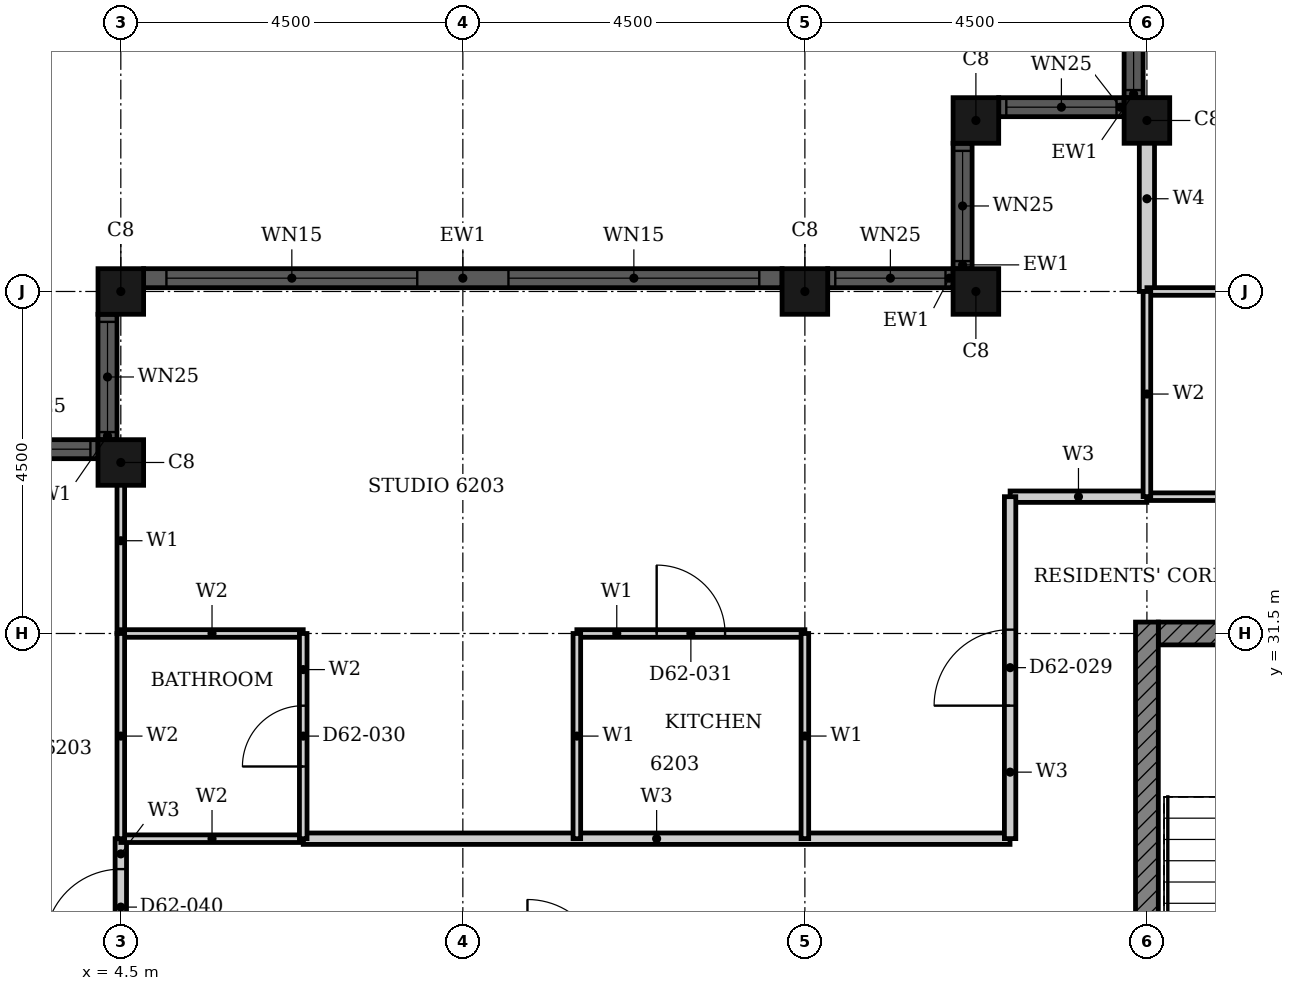
"""IFC4 building model, lengths in metres.
Left out: names, types, materials, properties, quantities, classifications, styles, units other than length and angle.
Written with IfcOpenShell. Run it as: python <this file> out.ifc"""

import sys

from ifc_helpers import new_model, si_unit, direction, frame, frame_2d, origin, origin_2d, place, context, subcontext, project, spatial, rectangle, hollow_rectangle, extrude, element, fill, save


model = new_model("IFC4")
c1 = context("Model", 3, precision=1e-05, world=origin(), true_north=direction((0.0, 1.0)))
c2 = subcontext(c1, "Body", "Model", "MODEL_VIEW")
j1 = project(units=[si_unit("LENGTHUNIT", "METRE"), si_unit("PLANEANGLEUNIT", "RADIAN")], contexts=[c1])
p1 = place(None, origin())
s1 = spatial("IfcSite", under=j1, at=p1, CompositionType="ELEMENT")
p2 = place(p1, origin())
s2 = spatial("IfcBuilding", under=s1, at=p2, CompositionType="ELEMENT")
p3 = place(p2, frame((0.0, 0.0, 245.3)))
s3 = spatial("IfcBuildingStorey", under=s2, at=p3, CompositionType="ELEMENT", Elevation=245.3)
for number, where, z_axis, x_axis in (
    (1, (18.0, 38.25, 0.0), (0.0, 0.0, 1.0), (1.0, 0.0, 0.0)),
    (2, (15.75, 38.25, 0.0), (0.0, 0.0, 1.0), (1.0, 0.0, 0.0)),
    (3, (15.75, 36.0, 0.0), (0.0, 0.0, 1.0), (1.0, 0.0, 0.0)),
    (4, (13.5, 36.0, 0.0), (0.0, 0.0, 1.0), (1.0, 0.0, 0.0)),
    (5, (4.5, 36.0, 0.0), (0.0, 0.0, 1.0), (1.0, 0.0, 0.0)),
    (6, (4.5, 33.75, 0.0), (0.0, 0.0, 1.0), (1.0, 0.0, 0.0)),
):
    element("IfcColumn", number, at=place(p3, frame(where, z_axis=z_axis, x_axis=x_axis)), inside=s3, PredefinedType="COLUMN", context=c2, shape_type="SweptSolid", body=[
        extrude(hollow_rectangle(XDim=0.6, YDim=0.6, WallThickness=0.02, at=origin_2d()), origin(), (0.0, 0.0, 1.0), 3.7),
    ])
p4 = place(p3, frame((17.825, 40.2, 0.0), z_axis=(0.0, 0.0, 1.0), x_axis=(0.0, -1.0, 0.0)))
e7 = element("IfcWall", 7, at=p4, inside=s3, PredefinedType="SOLIDWALL", context=c2, shape_type="SweptSolid", body=[
    extrude(rectangle(XDim=1.65, YDim=0.25, at=frame_2d((0.825, 0.0))), origin(), (0.0, 0.0, 1.0), 3.7),
])
p5 = place(p4, frame((0.1, 0.0, 0.9)))
e8 = element("IfcOpeningElement", 8, at=p5, cuts=e7, PredefinedType="OPENING", context=c2, shape_type="SweptSolid", body=[
    extrude(rectangle(XDim=1.45, YDim=1.85, at=frame_2d((0.725, 0.925))), frame((0.0, 0.135, 0.0), z_axis=(0.0, -1.0, 0.0), x_axis=(1.0, 0.0, 0.0)), (0.0, 0.0, 1.0), 0.27),
])
p6 = place(p3, frame((17.7, 38.425, 0.0), z_axis=(0.0, 0.0, 1.0), x_axis=(-1.0, 0.0, 0.0)))
e9 = element("IfcWall", 9, at=p6, inside=s3, PredefinedType="SOLIDWALL", context=c2, shape_type="SweptSolid", body=[
    extrude(rectangle(XDim=1.65, YDim=0.25, at=frame_2d((0.825, 0.0))), origin(), (0.0, 0.0, 1.0), 3.7),
])
p7 = place(p6, frame((0.1, 0.0, 0.9)))
e10 = element("IfcOpeningElement", 10, at=p7, cuts=e9, PredefinedType="OPENING", context=c2, shape_type="SweptSolid", body=[
    extrude(rectangle(XDim=1.45, YDim=1.85, at=frame_2d((0.725, 0.925))), frame((0.0, 0.135, 0.0), z_axis=(0.0, -1.0, 0.0), x_axis=(1.0, 0.0, 0.0)), (0.0, 0.0, 1.0), 0.27),
])
p8 = place(p3, frame((15.575, 37.95, 0.0), z_axis=(0.0, 0.0, 1.0), x_axis=(0.0, -1.0, 0.0)))
e11 = element("IfcWall", 11, at=p8, inside=s3, PredefinedType="SOLIDWALL", context=c2, shape_type="SweptSolid", body=[
    extrude(rectangle(XDim=1.65, YDim=0.25, at=frame_2d((0.825, 0.0))), origin(), (0.0, 0.0, 1.0), 3.7),
])
p9 = place(p8, frame((0.1, 0.0, 0.9)))
e12 = element("IfcOpeningElement", 12, at=p9, cuts=e11, PredefinedType="OPENING", context=c2, shape_type="SweptSolid", body=[
    extrude(rectangle(XDim=1.45, YDim=1.85, at=frame_2d((0.725, 0.925))), frame((0.0, 0.135, 0.0), z_axis=(0.0, -1.0, 0.0), x_axis=(1.0, 0.0, 0.0)), (0.0, 0.0, 1.0), 0.27),
])
p10 = place(p3, frame((15.45, 36.175, 0.0), z_axis=(0.0, 0.0, 1.0), x_axis=(-1.0, 0.0, 0.0)))
e13 = element("IfcWall", 13, at=p10, inside=s3, PredefinedType="SOLIDWALL", context=c2, shape_type="SweptSolid", body=[
    extrude(rectangle(XDim=1.65, YDim=0.25, at=frame_2d((0.825, 0.0))), origin(), (0.0, 0.0, 1.0), 3.7),
])
p11 = place(p10, frame((0.1, 0.0, 0.9)))
e14 = element("IfcOpeningElement", 14, at=p11, cuts=e13, PredefinedType="OPENING", context=c2, shape_type="SweptSolid", body=[
    extrude(rectangle(XDim=1.45, YDim=1.85, at=frame_2d((0.725, 0.925))), frame((0.0, 0.135, 0.0), z_axis=(0.0, -1.0, 0.0), x_axis=(1.0, 0.0, 0.0)), (0.0, 0.0, 1.0), 0.27),
])
p12 = place(p3, frame((13.2, 36.175, 0.0), z_axis=(0.0, 0.0, 1.0), x_axis=(-1.0, 0.0, 0.0)))
e15 = element("IfcWall", 15, at=p12, inside=s3, PredefinedType="SOLIDWALL", context=c2, shape_type="SweptSolid", body=[
    extrude(rectangle(XDim=8.4, YDim=0.25, at=frame_2d((4.2, 0.0))), origin(), (0.0, 0.0, 1.0), 3.7),
])
p13 = place(p12, frame((0.3, 0.0, 0.45)))
e16 = element("IfcOpeningElement", 16, at=p13, cuts=e15, PredefinedType="OPENING", context=c2, shape_type="SweptSolid", body=[
    extrude(rectangle(XDim=3.3, YDim=2.3, at=frame_2d((1.65, 1.15))), frame((0.0, 0.135, 0.0), z_axis=(0.0, -1.0, 0.0), x_axis=(1.0, 0.0, 0.0)), (0.0, 0.0, 1.0), 0.27),
])
p14 = place(p12, frame((4.8, 0.0, 0.45)))
e17 = element("IfcOpeningElement", 17, at=p14, cuts=e15, PredefinedType="OPENING", context=c2, shape_type="SweptSolid", body=[
    extrude(rectangle(XDim=3.3, YDim=2.3, at=frame_2d((1.65, 1.15))), frame((0.0, 0.135, 0.0), z_axis=(0.0, -1.0, 0.0), x_axis=(1.0, 0.0, 0.0)), (0.0, 0.0, 1.0), 0.27),
])
p15 = place(p3, frame((4.325, 35.7, 0.0), z_axis=(0.0, 0.0, 1.0), x_axis=(0.0, -1.0, 0.0)))
e18 = element("IfcWall", 18, at=p15, inside=s3, PredefinedType="SOLIDWALL", context=c2, shape_type="SweptSolid", body=[
    extrude(rectangle(XDim=1.65, YDim=0.25, at=frame_2d((0.825, 0.0))), origin(), (0.0, 0.0, 1.0), 3.7),
])
p16 = place(p15, frame((0.1, 0.0, 0.9)))
e19 = element("IfcOpeningElement", 19, at=p16, cuts=e18, PredefinedType="OPENING", context=c2, shape_type="SweptSolid", body=[
    extrude(rectangle(XDim=1.45, YDim=1.85, at=frame_2d((0.725, 0.925))), frame((0.0, 0.135, 0.0), z_axis=(0.0, -1.0, 0.0), x_axis=(1.0, 0.0, 0.0)), (0.0, 0.0, 1.0), 0.27),
])
p17 = place(p3, frame((4.2, 33.925, 0.0), z_axis=(0.0, 0.0, 1.0), x_axis=(-1.0, 0.0, 0.0)))
e20 = element("IfcWall", 20, at=p17, inside=s3, PredefinedType="SOLIDWALL", context=c2, shape_type="SweptSolid", body=[
    extrude(rectangle(XDim=1.65, YDim=0.25, at=frame_2d((0.825, 0.0))), origin(), (0.0, 0.0, 1.0), 3.7),
])
p18 = place(p17, frame((0.1, 0.0, 0.9)))
e21 = element("IfcOpeningElement", 21, at=p18, cuts=e20, PredefinedType="OPENING", context=c2, shape_type="SweptSolid", body=[
    extrude(rectangle(XDim=1.45, YDim=1.85, at=frame_2d((0.725, 0.925))), frame((0.0, 0.135, 0.0), z_axis=(0.0, -1.0, 0.0), x_axis=(1.0, 0.0, 0.0)), (0.0, 0.0, 1.0), 0.27),
])
p19 = place(p3, frame((18.15, 31.5, 0.0), z_axis=(0.0, 0.0, 1.0), x_axis=(1.0, 0.0, 0.0)))
e22 = element("IfcWall", 22, at=p19, inside=s3, PredefinedType="SHEAR", context=c2, shape_type="SweptSolid", body=[
    extrude(rectangle(XDim=9.368, YDim=0.3, at=frame_2d((4.684, 0.0))), origin(), (0.0, 0.0, 1.0), 3.4),
])
p20 = place(p19, frame((4.736, 0.0, 0.0)))
e23 = element("IfcOpeningElement", 23, at=p20, cuts=e22, PredefinedType="OPENING", context=c2, shape_type="SweptSolid", body=[
    extrude(rectangle(XDim=1.8, YDim=2.1, at=frame_2d((0.9, 1.05))), frame((0.0, 0.16, 0.0), z_axis=(0.0, -1.0, 0.0), x_axis=(1.0, 0.0, 0.0)), (0.0, 0.0, 1.0), 0.32),
])
p21 = place(p3, frame((18.0, 22.35, 0.0), z_axis=(0.0, 0.0, 1.0), x_axis=(0.0, 1.0, 0.0)))
e24 = element("IfcWall", 24, at=p21, inside=s3, PredefinedType="SHEAR", context=c2, shape_type="SweptSolid", body=[
    extrude(rectangle(XDim=9.3, YDim=0.3, at=frame_2d((4.65, 0.0))), origin(), (0.0, 0.0, 1.0), 3.4),
])
p22 = place(p3, frame((6.9, 28.8, 0.0), z_axis=(0.0, 0.0, 1.0), x_axis=(1.0, 0.0, 0.0)))
e25 = element("IfcWall", 25, at=p22, inside=s3, PredefinedType="PARTITIONING", context=c2, shape_type="SweptSolid", body=[
    extrude(rectangle(XDim=9.299, YDim=0.15, at=frame_2d((4.649, 0.0))), origin(), (0.0, 0.0, 1.0), 3.4),
])
p23 = place(p3, frame((16.2, 33.3, 0.0), z_axis=(0.0, 0.0, 1.0), x_axis=(1.0, 0.0, 0.0)))
e26 = element("IfcWall", 26, at=p23, inside=s3, PredefinedType="PARTITIONING", context=c2, shape_type="SweptSolid", body=[
    extrude(rectangle(XDim=1.799, YDim=0.15, at=frame_2d((0.899, 0.0))), origin(), (0.0, 0.0, 1.0), 3.4),
])
p24 = place(p3, frame((16.2, 28.801, 0.0), z_axis=(0.0, 0.0, 1.0), x_axis=(0.0, 1.0, 0.0)))
e27 = element("IfcWall", 27, at=p24, inside=s3, PredefinedType="PARTITIONING", context=c2, shape_type="SweptSolid", body=[
    extrude(rectangle(XDim=4.499, YDim=0.15, at=frame_2d((2.25, 0.0))), origin(), (0.0, 0.0, 1.0), 3.4),
])
p25 = place(p24, frame((1.75, 0.0, 0.0)))
e28 = element("IfcOpeningElement", 28, at=p25, cuts=e27, PredefinedType="OPENING", context=c2, shape_type="SweptSolid", body=[
    extrude(rectangle(XDim=1.0, YDim=2.2, at=frame_2d((0.5, 1.1))), frame((0.0, 0.085, 0.0), z_axis=(0.0, -1.0, 0.0), x_axis=(1.0, 0.0, 0.0)), (0.0, 0.0, 1.0), 0.17),
])
p26 = place(p3, frame((4.5, 27.0, 0.0), z_axis=(0.0, 0.0, 1.0), x_axis=(0.0, 1.0, 0.0)))
e29 = element("IfcWall", 29, at=p26, inside=s3, PredefinedType="PARTITIONING", context=c2, shape_type="SweptSolid", body=[
    extrude(rectangle(XDim=1.8, YDim=0.15, at=frame_2d((0.9, 0.0))), origin(), (0.0, 0.0, 1.0), 3.4),
])
p27 = place(p26, frame((0.4, 0.0, 0.0)))
e30 = element("IfcOpeningElement", 30, at=p27, cuts=e29, PredefinedType="OPENING", context=c2, shape_type="SweptSolid", body=[
    extrude(rectangle(XDim=1.0, YDim=2.1, at=frame_2d((0.5, 1.05))), frame((0.0, 0.085, 0.0), z_axis=(0.0, -1.0, 0.0), x_axis=(1.0, 0.0, 0.0)), (0.0, 0.0, 1.0), 0.17),
])
p28 = place(p3, frame((10.5, 31.5, 0.0), z_axis=(0.0, 0.0, 1.0), x_axis=(1.0, 0.0, 0.0)))
e31 = element("IfcWall", 31, at=p28, inside=s3, PredefinedType="PARTITIONING", context=c2, shape_type="SweptSolid", body=[
    extrude(rectangle(XDim=3.0, YDim=0.1, at=frame_2d((1.5, 0.0))), origin(), (0.0, 0.0, 1.0), 2.68),
])
p29 = place(p28, frame((1.05, 0.0, 0.0)))
e32 = element("IfcOpeningElement", 32, at=p29, cuts=e31, PredefinedType="OPENING", context=c2, shape_type="SweptSolid", body=[
    extrude(rectangle(XDim=0.9, YDim=2.1, at=frame_2d((0.45, 1.05))), frame((0.0, 0.06, 0.0), z_axis=(0.0, -1.0, 0.0), x_axis=(1.0, 0.0, 0.0)), (0.0, 0.0, 1.0), 0.12),
])
p30 = place(p3, frame((10.5, 28.8, 0.0), z_axis=(0.0, 0.0, 1.0), x_axis=(0.0, 1.0, 0.0)))
e33 = element("IfcWall", 33, at=p30, inside=s3, PredefinedType="PARTITIONING", context=c2, shape_type="SweptSolid", body=[
    extrude(rectangle(XDim=2.7, YDim=0.1, at=frame_2d((1.35, 0.0))), origin(), (0.0, 0.0, 1.0), 3.4),
])
p31 = place(p3, frame((13.5, 28.801, 0.0), z_axis=(0.0, 0.0, 1.0), x_axis=(0.0, 1.0, 0.0)))
e34 = element("IfcWall", 34, at=p31, inside=s3, PredefinedType="PARTITIONING", context=c2, shape_type="SweptSolid", body=[
    extrude(rectangle(XDim=2.699, YDim=0.1, at=frame_2d((1.35, 0.0))), origin(), (0.0, 0.0, 1.0), 2.48),
])
p32 = place(p3, frame((4.5, 31.501, 0.0), z_axis=(0.0, 0.0, 1.0), x_axis=(0.0, 1.0, 0.0)))
e35 = element("IfcWall", 35, at=p32, inside=s3, PredefinedType="PARTITIONING", context=c2, shape_type="SweptSolid", body=[
    extrude(rectangle(XDim=2.439, YDim=0.1, at=frame_2d((1.219, 0.0))), origin(), (0.0, 0.0, 1.0), 3.4),
])
p33 = place(p3, frame((18.0, 36.0, 0.0), z_axis=(0.0, 0.0, 1.0), x_axis=(0.0, 1.0, 0.0)))
e36 = element("IfcWall", 36, at=p33, inside=s3, PredefinedType="PARTITIONING", context=c2, shape_type="SweptSolid", body=[
    extrude(rectangle(XDim=2.44, YDim=0.2, at=frame_2d((1.22, 0.0))), origin(), (0.0, 0.0, 1.0), 3.4),
])
p34 = place(p3, frame((4.5, 28.8, 0.0), z_axis=(0.0, 0.0, 1.0), x_axis=(1.0, 0.0, 0.0)))
e37 = element("IfcWall", 37, at=p34, inside=s3, PredefinedType="PARTITIONING", context=c2, shape_type="SweptSolid", body=[
    extrude(rectangle(XDim=2.4, YDim=0.1, at=frame_2d((1.2, 0.0))), origin(), (0.0, 0.0, 1.0), 3.4),
])
p35 = place(p3, frame((4.5, 31.5, 0.0), z_axis=(0.0, 0.0, 1.0), x_axis=(1.0, 0.0, 0.0)))
e38 = element("IfcWall", 38, at=p35, inside=s3, PredefinedType="PARTITIONING", context=c2, shape_type="SweptSolid", body=[
    extrude(rectangle(XDim=2.4, YDim=0.1, at=frame_2d((1.2, 0.0))), origin(), (0.0, 0.0, 1.0), 2.68),
])
p36 = place(p3, frame((18.0, 33.3, 0.0), z_axis=(0.0, 0.0, 1.0), x_axis=(1.0, 0.0, 0.0)))
e39 = element("IfcWall", 39, at=p36, inside=s3, PredefinedType="PARTITIONING", context=c2, shape_type="SweptSolid", body=[
    extrude(rectangle(XDim=3.6, YDim=0.1, at=frame_2d((1.8, 0.0))), origin(), (0.0, 0.0, 1.0), 3.4),
])
p37 = place(p3, frame((18.0, 36.0, 0.0), z_axis=(0.0, 0.0, 1.0), x_axis=(1.0, 0.0, 0.0)))
e40 = element("IfcWall", 40, at=p37, inside=s3, PredefinedType="PARTITIONING", context=c2, shape_type="SweptSolid", body=[
    extrude(rectangle(XDim=3.6, YDim=0.1, at=frame_2d((1.8, 0.0))), origin(), (0.0, 0.0, 1.0), 3.4),
])
p38 = place(p37, frame((1.4, 0.0, 0.0)))
e41 = element("IfcOpeningElement", 41, at=p38, cuts=e40, PredefinedType="OPENING", context=c2, shape_type="SweptSolid", body=[
    extrude(rectangle(XDim=0.8, YDim=2.1, at=frame_2d((0.4, 1.05))), frame((0.0, 0.06, 0.0), z_axis=(0.0, -1.0, 0.0), x_axis=(1.0, 0.0, 0.0)), (0.0, 0.0, 1.0), 0.12),
])
p39 = place(p3, frame((18.0, 33.301, 0.0), z_axis=(0.0, 0.0, 1.0), x_axis=(0.0, 1.0, 0.0)))
e42 = element("IfcWall", 42, at=p39, inside=s3, PredefinedType="PARTITIONING", context=c2, shape_type="SweptSolid", body=[
    extrude(rectangle(XDim=2.699, YDim=0.1, at=frame_2d((1.35, 0.0))), origin(), (0.0, 0.0, 1.0), 3.4),
])
p40 = place(p3, frame((4.5, 28.8, 0.0), z_axis=(0.0, 0.0, 1.0), x_axis=(0.0, 1.0, 0.0)))
e43 = element("IfcWall", 43, at=p40, inside=s3, PredefinedType="PARTITIONING", context=c2, shape_type="SweptSolid", body=[
    extrude(rectangle(XDim=2.7, YDim=0.1, at=frame_2d((1.35, 0.0))), origin(), (0.0, 0.0, 1.0), 3.4),
])
p41 = place(p3, frame((6.9, 28.8, 0.0), z_axis=(0.0, 0.0, 1.0), x_axis=(0.0, 1.0, 0.0)))
e44 = element("IfcWall", 44, at=p41, inside=s3, PredefinedType="PARTITIONING", context=c2, shape_type="SweptSolid", body=[
    extrude(rectangle(XDim=2.7, YDim=0.1, at=frame_2d((1.35, 0.0))), origin(), (0.0, 0.0, 1.0), 3.4),
])
p42 = place(p41, frame((0.95, 0.0, 0.0)))
e45 = element("IfcOpeningElement", 45, at=p42, cuts=e44, PredefinedType="OPENING", context=c2, shape_type="SweptSolid", body=[
    extrude(rectangle(XDim=0.8, YDim=2.1, at=frame_2d((0.4, 1.05))), frame((0.0, 0.06, 0.0), z_axis=(0.0, -1.0, 0.0), x_axis=(1.0, 0.0, 0.0)), (0.0, 0.0, 1.0), 0.12),
])
p43 = place(p5, origin())
e46 = element("IfcWindow", 46, at=p43, inside=s3, PartitioningType="SINGLE_PANEL", PredefinedType="WINDOW", context=c2, shape_type="SweptSolid", body=[
    extrude(rectangle(XDim=1.45, YDim=1.85, at=frame_2d((0.725, 0.925))), frame((0.0, 0.03, 0.0), z_axis=(0.0, -1.0, 0.0), x_axis=(1.0, 0.0, 0.0)), (0.0, 0.0, 1.0), 0.06),
])
fill(e8, e46)
p44 = place(p7, origin())
e47 = element("IfcWindow", 47, at=p44, inside=s3, PartitioningType="SINGLE_PANEL", PredefinedType="WINDOW", context=c2, shape_type="SweptSolid", body=[
    extrude(rectangle(XDim=1.45, YDim=1.85, at=frame_2d((0.725, 0.925))), frame((0.0, 0.03, 0.0), z_axis=(0.0, -1.0, 0.0), x_axis=(1.0, 0.0, 0.0)), (0.0, 0.0, 1.0), 0.06),
])
fill(e10, e47)
p45 = place(p9, origin())
e48 = element("IfcWindow", 48, at=p45, inside=s3, PartitioningType="SINGLE_PANEL", PredefinedType="WINDOW", context=c2, shape_type="SweptSolid", body=[
    extrude(rectangle(XDim=1.45, YDim=1.85, at=frame_2d((0.725, 0.925))), frame((0.0, 0.03, 0.0), z_axis=(0.0, -1.0, 0.0), x_axis=(1.0, 0.0, 0.0)), (0.0, 0.0, 1.0), 0.06),
])
fill(e12, e48)
p46 = place(p11, origin())
e49 = element("IfcWindow", 49, at=p46, inside=s3, PartitioningType="SINGLE_PANEL", PredefinedType="WINDOW", context=c2, shape_type="SweptSolid", body=[
    extrude(rectangle(XDim=1.45, YDim=1.85, at=frame_2d((0.725, 0.925))), frame((0.0, 0.03, 0.0), z_axis=(0.0, -1.0, 0.0), x_axis=(1.0, 0.0, 0.0)), (0.0, 0.0, 1.0), 0.06),
])
fill(e14, e49)
p47 = place(p13, origin())
e50 = element("IfcWindow", 50, at=p47, inside=s3, PartitioningType="SINGLE_PANEL", PredefinedType="WINDOW", context=c2, shape_type="SweptSolid", body=[
    extrude(rectangle(XDim=3.3, YDim=2.3, at=frame_2d((1.65, 1.15))), frame((0.0, 0.03, 0.0), z_axis=(0.0, -1.0, 0.0), x_axis=(1.0, 0.0, 0.0)), (0.0, 0.0, 1.0), 0.06),
])
fill(e16, e50)
p48 = place(p14, origin())
e51 = element("IfcWindow", 51, at=p48, inside=s3, PartitioningType="SINGLE_PANEL", PredefinedType="WINDOW", context=c2, shape_type="SweptSolid", body=[
    extrude(rectangle(XDim=3.3, YDim=2.3, at=frame_2d((1.65, 1.15))), frame((0.0, 0.03, 0.0), z_axis=(0.0, -1.0, 0.0), x_axis=(1.0, 0.0, 0.0)), (0.0, 0.0, 1.0), 0.06),
])
fill(e17, e51)
p49 = place(p16, origin())
e52 = element("IfcWindow", 52, at=p49, inside=s3, PartitioningType="SINGLE_PANEL", PredefinedType="WINDOW", context=c2, shape_type="SweptSolid", body=[
    extrude(rectangle(XDim=1.45, YDim=1.85, at=frame_2d((0.725, 0.925))), frame((0.0, 0.03, 0.0), z_axis=(0.0, -1.0, 0.0), x_axis=(1.0, 0.0, 0.0)), (0.0, 0.0, 1.0), 0.06),
])
fill(e19, e52)
p50 = place(p18, origin())
e53 = element("IfcWindow", 53, at=p50, inside=s3, PartitioningType="SINGLE_PANEL", PredefinedType="WINDOW", context=c2, shape_type="SweptSolid", body=[
    extrude(rectangle(XDim=1.45, YDim=1.85, at=frame_2d((0.725, 0.925))), frame((0.0, 0.03, 0.0), z_axis=(0.0, -1.0, 0.0), x_axis=(1.0, 0.0, 0.0)), (0.0, 0.0, 1.0), 0.06),
])
fill(e21, e53)
p51 = place(p25, origin())
e54 = element("IfcDoor", 54, at=p51, inside=s3, OperationType="SINGLE_SWING_RIGHT", PredefinedType="DOOR", context=c2, shape_type="SweptSolid", body=[
    extrude(rectangle(XDim=1.0, YDim=2.2, at=frame_2d((0.5, 1.1))), frame((0.0, 0.025, 0.0), z_axis=(0.0, -1.0, 0.0), x_axis=(1.0, 0.0, 0.0)), (0.0, 0.0, 1.0), 0.05),
])
fill(e28, e54)
p52 = place(p42, origin())
e55 = element("IfcDoor", 55, at=p52, inside=s3, OperationType="SINGLE_SWING_RIGHT", PredefinedType="DOOR", context=c2, shape_type="SweptSolid", body=[
    extrude(rectangle(XDim=0.8, YDim=2.1, at=frame_2d((0.4, 1.05))), frame((0.0, 0.025, 0.0), z_axis=(0.0, -1.0, 0.0), x_axis=(1.0, 0.0, 0.0)), (0.0, 0.0, 1.0), 0.05),
])
fill(e45, e55)
p53 = place(p29, origin())
e56 = element("IfcDoor", 56, at=p53, inside=s3, OperationType="SINGLE_SWING_LEFT", PredefinedType="DOOR", context=c2, shape_type="SweptSolid", body=[
    extrude(rectangle(XDim=0.9, YDim=2.1, at=frame_2d((0.45, 1.05))), frame((0.0, 0.025, 0.0), z_axis=(0.0, -1.0, 0.0), x_axis=(1.0, 0.0, 0.0)), (0.0, 0.0, 1.0), 0.05),
])
fill(e32, e56)
p54 = place(p27, origin())
e57 = element("IfcDoor", 57, at=p54, inside=s3, OperationType="SINGLE_SWING_RIGHT", PredefinedType="DOOR", context=c2, shape_type="SweptSolid", body=[
    extrude(rectangle(XDim=1.0, YDim=2.1, at=frame_2d((0.5, 1.05))), frame((0.0, 0.025, 0.0), z_axis=(0.0, -1.0, 0.0), x_axis=(1.0, 0.0, 0.0)), (0.0, 0.0, 1.0), 0.05),
])
fill(e30, e57)
save(model, sys.argv[1])
